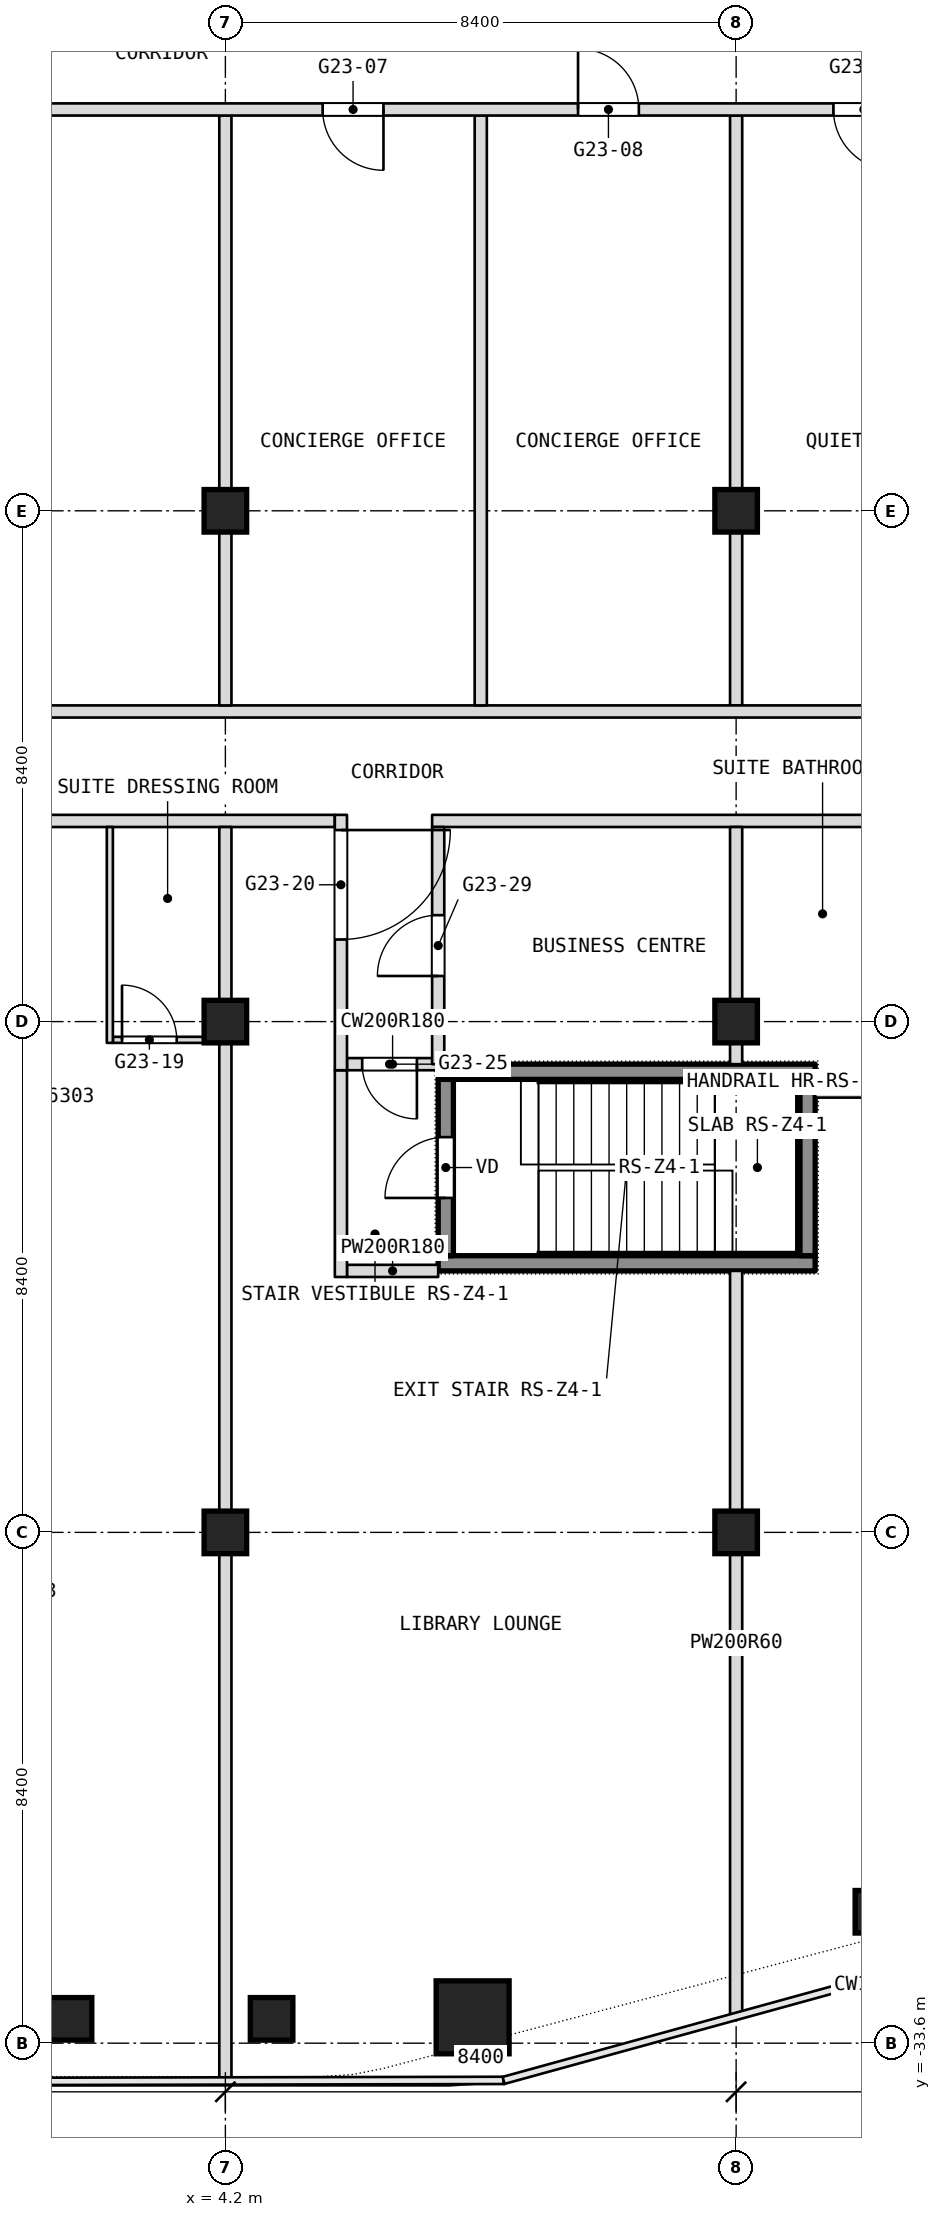
"""IFC4 building model, lengths in metres.
Left out: names, types, materials, properties, quantities, classifications, styles, units other than length and angle.
Written with IfcOpenShell. Run it as: python <this file> out.ifc"""

import sys

from ifc_helpers import new_model, si_unit, direction, frame, frame_2d, origin, origin_2d, place, context, subcontext, project, spatial, rectangle, extrude, element, fill, save


model = new_model("IFC4")
c1 = context("Model", 3, precision=1e-05, world=origin(), true_north=direction((0.0, 1.0)))
c2 = subcontext(c1, "Body", "Model", "MODEL_VIEW")
j1 = project(units=[si_unit("LENGTHUNIT", "METRE"), si_unit("PLANEANGLEUNIT", "RADIAN")], contexts=[c1])
p1 = place(None, origin())
s1 = spatial("IfcSite", under=j1, at=p1, CompositionType="ELEMENT")
p2 = place(p1, origin())
s2 = spatial("IfcBuilding", under=s1, at=p2, CompositionType="ELEMENT")
p3 = place(p2, frame((0.0, 0.0, 274.1)))
s3 = spatial("IfcBuildingStorey", under=s2, at=p3, CompositionType="ELEMENT", Elevation=274.1)
p4 = place(p3, frame((8.266, -33.175, 0.0), z_axis=(0.0, 0.0, 1.0), x_axis=(1.0, 0.0, 0.0)))
e1 = element("IfcColumn", 1, at=p4, inside=s3, PredefinedType="COLUMN", context=c2, shape_type="SweptSolid", body=[
    extrude(rectangle(XDim=1.2, YDim=1.2, at=origin_2d()), origin(), (0.0, 0.0, 1.0), 3.6),
])
for number, where, z_axis, x_axis in (
    (2, (4.2, -25.2, 0.0), (0.0, 0.0, 1.0), (1.0, 0.0, 0.0)),
    (3, (4.2, -16.8, 0.0), (0.0, 0.0, 1.0), (1.0, 0.0, 0.0)),
    (4, (4.2, -8.4, 0.0), (0.0, 0.0, 1.0), (1.0, 0.0, 0.0)),
    (5, (12.6, -25.2, 0.0), (0.0, 0.0, 1.0), (1.0, 0.0, 0.0)),
    (6, (12.6, -16.8, 0.0), (0.0, 0.0, 1.0), (1.0, 0.0, 0.0)),
    (7, (12.6, -8.4, 0.0), (0.0, 0.0, 1.0), (1.0, 0.0, 0.0)),
    (8, (14.907, -31.439, 0.0), (0.0, 0.0, 1.0), (1.0, 0.0, 0.0)),
    (9, (4.96, -33.2, 0.0), (0.0, 0.0, 1.0), (1.0, 0.0, 0.0)),
    (10, (1.653, -33.2, 0.0), (0.0, 0.0, 1.0), (1.0, 0.0, 0.0)),
):
    element("IfcColumn", number, at=place(p3, frame(where, z_axis=z_axis, x_axis=x_axis)), inside=s3, PredefinedType="COLUMN", context=c2, shape_type="SweptSolid", body=[
        extrude(rectangle(XDim=0.7, YDim=0.7, at=origin_2d()), origin(), (0.0, 0.0, 1.0), 3.6),
    ])
p5 = place(p3, frame((6.2, -20.9, 0.0), z_axis=(0.0, 0.0, 1.0), x_axis=(1.0, 0.0, 0.0)))
e11 = element("IfcWall", 11, at=p5, inside=s3, PredefinedType="PARTITIONING", context=c2, shape_type="SweptSolid", body=[
    extrude(rectangle(XDim=1.5, YDim=0.2, at=frame_2d((0.75, 0.0))), origin(), (0.0, 0.0, 1.0), 3.34),
])
p6 = place(p3, frame((13.9, -18.0, 0.0), z_axis=(0.0, 0.0, 1.0), x_axis=(1.0, 0.0, 0.0)))
e12 = element("IfcWall", 12, at=p6, inside=s3, PredefinedType="PARTITIONING", context=c2, shape_type="SweptSolid", body=[
    extrude(rectangle(XDim=2.35, YDim=0.1, at=frame_2d((1.175, 0.0))), origin(), (0.0, 0.0, 1.0), 3.34),
])
p7 = place(p3, frame((6.2, -17.5, 0.0), z_axis=(0.0, 0.0, 1.0), x_axis=(1.0, 0.0, 0.0)))
e13 = element("IfcWall", 13, at=p7, inside=s3, PredefinedType="PARTITIONING", context=c2, shape_type="SweptSolid", body=[
    extrude(rectangle(XDim=1.5, YDim=0.2, at=frame_2d((0.75, 0.0))), origin(), (0.0, 0.0, 1.0), 3.34),
])
p8 = place(p7, frame((0.25, 0.0, 0.0)))
e14 = element("IfcOpeningElement", 14, at=p8, cuts=e13, PredefinedType="OPENING", context=c2, shape_type="SweptSolid", body=[
    extrude(rectangle(XDim=0.9, YDim=2.1, at=frame_2d((0.45, 1.05))), frame((0.0, 0.1, 0.0), z_axis=(0.0, -1.0, 0.0), x_axis=(1.0, 0.0, 0.0)), (0.0, 0.0, 1.0), 0.2),
])
p9 = place(p3, frame((2.35, -17.1, 0.0), z_axis=(0.0, 0.0, 1.0), x_axis=(1.0, 0.0, 0.0)))
e15 = element("IfcWall", 15, at=p9, inside=s3, PredefinedType="PARTITIONING", context=c2, shape_type="SweptSolid", body=[
    extrude(rectangle(XDim=1.95, YDim=0.1, at=frame_2d((0.975, 0.0))), origin(), (0.0, 0.0, 1.0), 3.34),
])
p10 = place(p9, frame((0.15, 0.0, 0.0)))
e16 = element("IfcOpeningElement", 16, at=p10, cuts=e15, PredefinedType="OPENING", context=c2, shape_type="SweptSolid", body=[
    extrude(rectangle(XDim=0.9, YDim=2.1, at=frame_2d((0.45, 1.05))), frame((0.0, 0.05, 0.0), z_axis=(0.0, -1.0, 0.0), x_axis=(1.0, 0.0, 0.0)), (0.0, 0.0, 1.0), 0.1),
])
p11 = place(p3, frame((-10.0, -13.5, 0.0), z_axis=(0.0, 0.0, 1.0), x_axis=(1.0, 0.0, 0.0)))
e17 = element("IfcWall", 17, at=p11, inside=s3, PredefinedType="PARTITIONING", context=c2, shape_type="SweptSolid", body=[
    extrude(rectangle(XDim=16.0, YDim=0.2, at=frame_2d((8.0, 0.0))), origin(), (0.0, 0.0, 1.0), 3.34),
])
p12 = place(p11, frame((0.25, 0.0, 0.0)))
e18 = element("IfcOpeningElement", 18, at=p12, cuts=e17, PredefinedType="OPENING", context=c2, shape_type="SweptSolid", body=[
    extrude(rectangle(XDim=1.1, YDim=2.1, at=frame_2d((0.55, 1.05))), frame((0.0, 0.1, 0.0), z_axis=(0.0, -1.0, 0.0), x_axis=(1.0, 0.0, 0.0)), (0.0, 0.0, 1.0), 0.2),
])
p13 = place(p11, frame((9.5, 0.0, 0.0)))
e19 = element("IfcOpeningElement", 19, at=p13, cuts=e17, PredefinedType="OPENING", context=c2, shape_type="SweptSolid", body=[
    extrude(rectangle(XDim=1.1, YDim=2.1, at=frame_2d((0.55, 1.05))), frame((0.0, 0.1, 0.0), z_axis=(0.0, -1.0, 0.0), x_axis=(1.0, 0.0, 0.0)), (0.0, 0.0, 1.0), 0.2),
])
p14 = place(p3, frame((7.6, -13.5, 0.0), z_axis=(0.0, 0.0, 1.0), x_axis=(1.0, 0.0, 0.0)))
e20 = element("IfcWall", 20, at=p14, inside=s3, PredefinedType="PARTITIONING", context=c2, shape_type="SweptSolid", body=[
    extrude(rectangle(XDim=13.4, YDim=0.2, at=frame_2d((6.7, 0.0))), origin(), (0.0, 0.0, 1.0), 3.34),
])
p15 = place(p14, frame((8.7, 0.0, 0.0)))
e21 = element("IfcOpeningElement", 21, at=p15, cuts=e20, PredefinedType="OPENING", context=c2, shape_type="SweptSolid", body=[
    extrude(rectangle(XDim=1.1, YDim=2.1, at=frame_2d((0.55, 1.05))), frame((0.0, 0.1, 0.0), z_axis=(0.0, -1.0, 0.0), x_axis=(1.0, 0.0, 0.0)), (0.0, 0.0, 1.0), 0.2),
])
p16 = place(p3, frame((12.6, -33.13, 0.0), z_axis=(0.0, 0.0, 1.0), x_axis=(0.0, 1.0, 0.0)))
e22 = element("IfcWall", 22, at=p16, inside=s3, PredefinedType="PARTITIONING", context=c2, shape_type="SweptSolid", body=[
    extrude(rectangle(XDim=12.23, YDim=0.2, at=frame_2d((6.115, 0.0))), origin(), (0.0, 0.0, 1.0), 3.34),
])
p17 = place(p3, frame((12.6, -17.5, 0.0), z_axis=(0.0, 0.0, 1.0), x_axis=(0.0, 1.0, 0.0)))
e23 = element("IfcWall", 23, at=p17, inside=s3, PredefinedType="PARTITIONING", context=c2, shape_type="SweptSolid", body=[
    extrude(rectangle(XDim=3.9, YDim=0.2, at=frame_2d((1.95, 0.0))), origin(), (0.0, 0.0, 1.0), 3.34),
])
p18 = place(p3, frame((12.6, -11.6, 0.0), z_axis=(0.0, 0.0, 1.0), x_axis=(0.0, 1.0, 0.0)))
e24 = element("IfcWall", 24, at=p18, inside=s3, PredefinedType="PARTITIONING", context=c2, shape_type="SweptSolid", body=[
    extrude(rectangle(XDim=9.7, YDim=0.2, at=frame_2d((4.85, 0.0))), origin(), (0.0, 0.0, 1.0), 3.34),
])
p19 = place(p3, frame((-8.3, -11.7, 0.0), z_axis=(0.0, 0.0, 1.0), x_axis=(1.0, 0.0, 0.0)))
e25 = element("IfcWall", 25, at=p19, inside=s3, PredefinedType="PARTITIONING", context=c2, shape_type="SweptSolid", body=[
    extrude(rectangle(XDim=25.0, YDim=0.2, at=frame_2d((12.5, 0.0))), origin(), (0.0, 0.0, 1.0), 3.34),
])
p20 = place(p3, frame((8.4, -11.6, 0.0), z_axis=(0.0, 0.0, 1.0), x_axis=(0.0, 1.0, 0.0)))
e26 = element("IfcWall", 26, at=p20, inside=s3, PredefinedType="PARTITIONING", context=c2, shape_type="SweptSolid", body=[
    extrude(rectangle(XDim=9.7, YDim=0.2, at=frame_2d((4.85, 0.0))), origin(), (0.0, 0.0, 1.0), 3.34),
])
p21 = place(p3, frame((7.7, -17.5, 0.0), z_axis=(0.0, 0.0, 1.0), x_axis=(0.0, 1.0, 0.0)))
e27 = element("IfcWall", 27, at=p21, inside=s3, PredefinedType="PARTITIONING", context=c2, shape_type="SweptSolid", body=[
    extrude(rectangle(XDim=3.9, YDim=0.2, at=frame_2d((1.95, 0.0))), origin(), (0.0, 0.0, 1.0), 3.34),
])
p22 = place(p21, frame((1.45, 0.0, 0.0)))
e28 = element("IfcOpeningElement", 28, at=p22, cuts=e27, PredefinedType="OPENING", context=c2, shape_type="SweptSolid", body=[
    extrude(rectangle(XDim=1.0, YDim=2.1, at=frame_2d((0.5, 1.05))), frame((0.0, 0.1, 0.0), z_axis=(0.0, -1.0, 0.0), x_axis=(1.0, 0.0, 0.0)), (0.0, 0.0, 1.0), 0.2),
])
p23 = place(p3, frame((6.1, -21.0, 0.0), z_axis=(0.0, 0.0, 1.0), x_axis=(0.0, 1.0, 0.0)))
e29 = element("IfcWall", 29, at=p23, inside=s3, PredefinedType="PARTITIONING", context=c2, shape_type="SweptSolid", body=[
    extrude(rectangle(XDim=3.4, YDim=0.2, at=frame_2d((1.7, 0.0))), origin(), (0.0, 0.0, 1.0), 3.34),
])
p24 = place(p3, frame((6.1, -17.6, 0.0), z_axis=(0.0, 0.0, 1.0), x_axis=(0.0, 1.0, 0.0)))
e30 = element("IfcWall", 30, at=p24, inside=s3, PredefinedType="PARTITIONING", context=c2, shape_type="SweptSolid", body=[
    extrude(rectangle(XDim=4.2, YDim=0.2, at=frame_2d((2.1, 0.0))), origin(), (0.0, 0.0, 1.0), 3.34),
])
p25 = place(p24, frame((2.15, 0.0, 0.0)))
e31 = element("IfcOpeningElement", 31, at=p25, cuts=e30, PredefinedType="OPENING", context=c2, shape_type="SweptSolid", body=[
    extrude(rectangle(XDim=1.8, YDim=2.1, at=frame_2d((0.9, 1.05))), frame((0.0, 0.1, 0.0), z_axis=(0.0, -1.0, 0.0), x_axis=(1.0, 0.0, 0.0)), (0.0, 0.0, 1.0), 0.2),
])
p26 = place(p3, frame((4.2, -34.2, 0.0), z_axis=(0.0, 0.0, 1.0), x_axis=(0.0, 1.0, 0.0)))
e32 = element("IfcWall", 32, at=p26, inside=s3, PredefinedType="PARTITIONING", context=c2, shape_type="SweptSolid", body=[
    extrude(rectangle(XDim=20.6, YDim=0.2, at=frame_2d((10.3, 0.0))), origin(), (0.0, 0.0, 1.0), 3.34),
])
p27 = place(p3, frame((4.2, -11.6, 0.0), z_axis=(0.0, 0.0, 1.0), x_axis=(0.0, 1.0, 0.0)))
e33 = element("IfcWall", 33, at=p27, inside=s3, PredefinedType="PARTITIONING", context=c2, shape_type="SweptSolid", body=[
    extrude(rectangle(XDim=9.7, YDim=0.2, at=frame_2d((4.85, 0.0))), origin(), (0.0, 0.0, 1.0), 3.34),
])
p28 = place(p3, frame((2.3, -17.15, 0.0), z_axis=(0.0, 0.0, 1.0), x_axis=(0.0, 1.0, 0.0)))
e34 = element("IfcWall", 34, at=p28, inside=s3, PredefinedType="PARTITIONING", context=c2, shape_type="SweptSolid", body=[
    extrude(rectangle(XDim=3.55, YDim=0.1, at=frame_2d((1.775, 0.0))), origin(), (0.0, 0.0, 1.0), 3.34),
])
p29 = place(p3, frame((-16.9, -1.8, 0.0), z_axis=(0.0, 0.0, 1.0), x_axis=(1.0, 0.0, 0.0)))
e35 = element("IfcWall", 35, at=p29, inside=s3, PredefinedType="PARTITIONING", context=c2, shape_type="SweptSolid", body=[
    extrude(rectangle(XDim=33.8, YDim=0.2, at=frame_2d((16.9, 0.0))), origin(), (0.0, 0.0, 1.0), 3.34),
])
p30 = place(p29, frame((1.7, 0.0, 0.0)))
e36 = element("IfcOpeningElement", 36, at=p30, cuts=e35, PredefinedType="OPENING", context=c2, shape_type="SweptSolid", body=[
    extrude(rectangle(XDim=1.0, YDim=2.1, at=frame_2d((0.5, 1.05))), frame((0.0, 0.1, 0.0), z_axis=(0.0, -1.0, 0.0), x_axis=(1.0, 0.0, 0.0)), (0.0, 0.0, 1.0), 0.2),
])
p31 = place(p29, frame((5.9, 0.0, 0.0)))
e37 = element("IfcOpeningElement", 37, at=p31, cuts=e35, PredefinedType="OPENING", context=c2, shape_type="SweptSolid", body=[
    extrude(rectangle(XDim=1.0, YDim=2.1, at=frame_2d((0.5, 1.05))), frame((0.0, 0.1, 0.0), z_axis=(0.0, -1.0, 0.0), x_axis=(1.0, 0.0, 0.0)), (0.0, 0.0, 1.0), 0.2),
])
p32 = place(p29, frame((10.1, 0.0, 0.0)))
e38 = element("IfcOpeningElement", 38, at=p32, cuts=e35, PredefinedType="OPENING", context=c2, shape_type="SweptSolid", body=[
    extrude(rectangle(XDim=1.0, YDim=2.1, at=frame_2d((0.5, 1.05))), frame((0.0, 0.1, 0.0), z_axis=(0.0, -1.0, 0.0), x_axis=(1.0, 0.0, 0.0)), (0.0, 0.0, 1.0), 0.2),
])
p33 = place(p29, frame((16.0, 0.0, 0.0)))
e39 = element("IfcOpeningElement", 39, at=p33, cuts=e35, PredefinedType="OPENING", context=c2, shape_type="SweptSolid", body=[
    extrude(rectangle(XDim=1.8, YDim=2.1, at=frame_2d((0.9, 1.05))), frame((0.0, 0.1, 0.0), z_axis=(0.0, -1.0, 0.0), x_axis=(1.0, 0.0, 0.0)), (0.0, 0.0, 1.0), 0.2),
])
p34 = place(p29, frame((22.7, 0.0, 0.0)))
e40 = element("IfcOpeningElement", 40, at=p34, cuts=e35, PredefinedType="OPENING", context=c2, shape_type="SweptSolid", body=[
    extrude(rectangle(XDim=1.0, YDim=2.1, at=frame_2d((0.5, 1.05))), frame((0.0, 0.1, 0.0), z_axis=(0.0, -1.0, 0.0), x_axis=(1.0, 0.0, 0.0)), (0.0, 0.0, 1.0), 0.2),
])
p35 = place(p29, frame((26.9, 0.0, 0.0)))
e41 = element("IfcOpeningElement", 41, at=p35, cuts=e35, PredefinedType="OPENING", context=c2, shape_type="SweptSolid", body=[
    extrude(rectangle(XDim=1.0, YDim=2.1, at=frame_2d((0.5, 1.05))), frame((0.0, 0.1, 0.0), z_axis=(0.0, -1.0, 0.0), x_axis=(1.0, 0.0, 0.0)), (0.0, 0.0, 1.0), 0.2),
])
p36 = place(p29, frame((31.1, 0.0, 0.0)))
e42 = element("IfcOpeningElement", 42, at=p36, cuts=e35, PredefinedType="OPENING", context=c2, shape_type="SweptSolid", body=[
    extrude(rectangle(XDim=1.0, YDim=2.1, at=frame_2d((0.5, 1.05))), frame((0.0, 0.1, 0.0), z_axis=(0.0, -1.0, 0.0), x_axis=(1.0, 0.0, 0.0)), (0.0, 0.0, 1.0), 0.2),
])
for number, where, z_axis, x_axis in (
    (43, (7.7, -20.775, 0.1), (0.0, 0.0, 1.0), (1.0, 0.0, 0.0)),
    (44, (7.7, -17.625, 0.1), (0.0, 0.0, 1.0), (1.0, 0.0, 0.0)),
):
    element("IfcWall", number, at=place(p3, frame(where, z_axis=z_axis, x_axis=x_axis)), inside=s3, PredefinedType="SHEAR", context=c2, shape_type="SweptSolid", body=[
        extrude(rectangle(XDim=6.2, YDim=0.25, at=frame_2d((3.1, 0.0))), origin(), (0.0, 0.0, 1.0), 3.6),
    ])
p37 = place(p3, frame((7.825, -20.65, 0.1), z_axis=(0.0, 0.0, 1.0), x_axis=(0.0, 1.0, 0.0)))
e45 = element("IfcWall", 45, at=p37, inside=s3, PredefinedType="SHEAR", context=c2, shape_type="SweptSolid", body=[
    extrude(rectangle(XDim=2.9, YDim=0.25, at=frame_2d((1.45, 0.0))), origin(), (0.0, 0.0, 1.0), 3.6),
])
p38 = place(p37, frame((0.95, 0.0, 0.0)))
e46 = element("IfcOpeningElement", 46, at=p38, cuts=e45, PredefinedType="OPENING", context=c2, shape_type="SweptSolid", body=[
    extrude(rectangle(XDim=1.0, YDim=2.1, at=frame_2d((0.5, 1.05))), frame((0.0, 0.125, 0.0), z_axis=(0.0, -1.0, 0.0), x_axis=(1.0, 0.0, 0.0)), (0.0, 0.0, 1.0), 0.25),
])
p39 = place(p3, frame((13.775, -20.65, 0.1), z_axis=(0.0, 0.0, 1.0), x_axis=(0.0, 1.0, 0.0)))
e47 = element("IfcWall", 47, at=p39, inside=s3, PredefinedType="SHEAR", context=c2, shape_type="SweptSolid", body=[
    extrude(rectangle(XDim=2.9, YDim=0.25, at=frame_2d((1.45, 0.0))), origin(), (0.0, 0.0, 1.0), 3.6),
])
p40 = place(p8, origin())
e48 = element("IfcDoor", 48, at=p40, inside=s3, OperationType="SINGLE_SWING_LEFT", PredefinedType="DOOR", context=c2, shape_type="SweptSolid", body=[
    extrude(rectangle(XDim=0.9, YDim=2.1, at=frame_2d((0.45, 1.05))), frame((0.0, 0.025, 0.0), z_axis=(0.0, -1.0, 0.0), x_axis=(1.0, 0.0, 0.0)), (0.0, 0.0, 1.0), 0.05),
])
fill(e14, e48)
p41 = place(p10, origin())
e49 = element("IfcDoor", 49, at=p41, inside=s3, OperationType="SINGLE_SWING_LEFT", PredefinedType="DOOR", context=c2, shape_type="SweptSolid", body=[
    extrude(rectangle(XDim=0.9, YDim=2.1, at=frame_2d((0.45, 1.05))), frame((0.0, 0.025, 0.0), z_axis=(0.0, -1.0, 0.0), x_axis=(1.0, 0.0, 0.0)), (0.0, 0.0, 1.0), 0.05),
])
fill(e16, e49)
p42 = place(p22, origin())
e50 = element("IfcDoor", 50, at=p42, inside=s3, OperationType="SINGLE_SWING_LEFT", PredefinedType="DOOR", context=c2, shape_type="SweptSolid", body=[
    extrude(rectangle(XDim=1.0, YDim=2.1, at=frame_2d((0.5, 1.05))), frame((0.0, 0.025, 0.0), z_axis=(0.0, -1.0, 0.0), x_axis=(1.0, 0.0, 0.0)), (0.0, 0.0, 1.0), 0.05),
])
fill(e28, e50)
p43 = place(p25, origin())
e51 = element("IfcDoor", 51, at=p43, inside=s3, OperationType="DOUBLE_DOOR_SINGLE_SWING", PredefinedType="DOOR", context=c2, shape_type="SweptSolid", body=[
    extrude(rectangle(XDim=1.8, YDim=2.1, at=frame_2d((0.9, 1.05))), frame((0.0, 0.025, 0.0), z_axis=(0.0, -1.0, 0.0), x_axis=(1.0, 0.0, 0.0)), (0.0, 0.0, 1.0), 0.05),
])
fill(e31, e51)
p44 = place(p34, origin())
e52 = element("IfcDoor", 52, at=p44, inside=s3, OperationType="SINGLE_SWING_RIGHT", PredefinedType="DOOR", context=c2, shape_type="SweptSolid", body=[
    extrude(rectangle(XDim=1.0, YDim=2.1, at=frame_2d((0.5, 1.05))), frame((0.0, 0.025, 0.0), z_axis=(0.0, -1.0, 0.0), x_axis=(1.0, 0.0, 0.0)), (0.0, 0.0, 1.0), 0.05),
])
fill(e40, e52)
p45 = place(p35, origin())
e53 = element("IfcDoor", 53, at=p45, inside=s3, OperationType="SINGLE_SWING_LEFT", PredefinedType="DOOR", context=c2, shape_type="SweptSolid", body=[
    extrude(rectangle(XDim=1.0, YDim=2.1, at=frame_2d((0.5, 1.05))), frame((0.0, 0.025, 0.0), z_axis=(0.0, -1.0, 0.0), x_axis=(1.0, 0.0, 0.0)), (0.0, 0.0, 1.0), 0.05),
])
fill(e41, e53)
p46 = place(p36, origin())
e54 = element("IfcDoor", 54, at=p46, inside=s3, OperationType="SINGLE_SWING_RIGHT", PredefinedType="DOOR", context=c2, shape_type="SweptSolid", body=[
    extrude(rectangle(XDim=1.0, YDim=2.1, at=frame_2d((0.5, 1.05))), frame((0.0, 0.025, 0.0), z_axis=(0.0, -1.0, 0.0), x_axis=(1.0, 0.0, 0.0)), (0.0, 0.0, 1.0), 0.05),
])
fill(e42, e54)
p47 = place(p38, origin())
e55 = element("IfcDoor", 55, at=p47, inside=s3, OperationType="SINGLE_SWING_LEFT", PredefinedType="DOOR", context=c2, shape_type="SweptSolid", body=[
    extrude(rectangle(XDim=1.0, YDim=2.1, at=frame_2d((0.5, 1.05))), frame((0.0, 0.025, 0.0), z_axis=(0.0, -1.0, 0.0), x_axis=(1.0, 0.0, 0.0)), (0.0, 0.0, 1.0), 0.05),
])
fill(e46, e55)
save(model, sys.argv[1])
